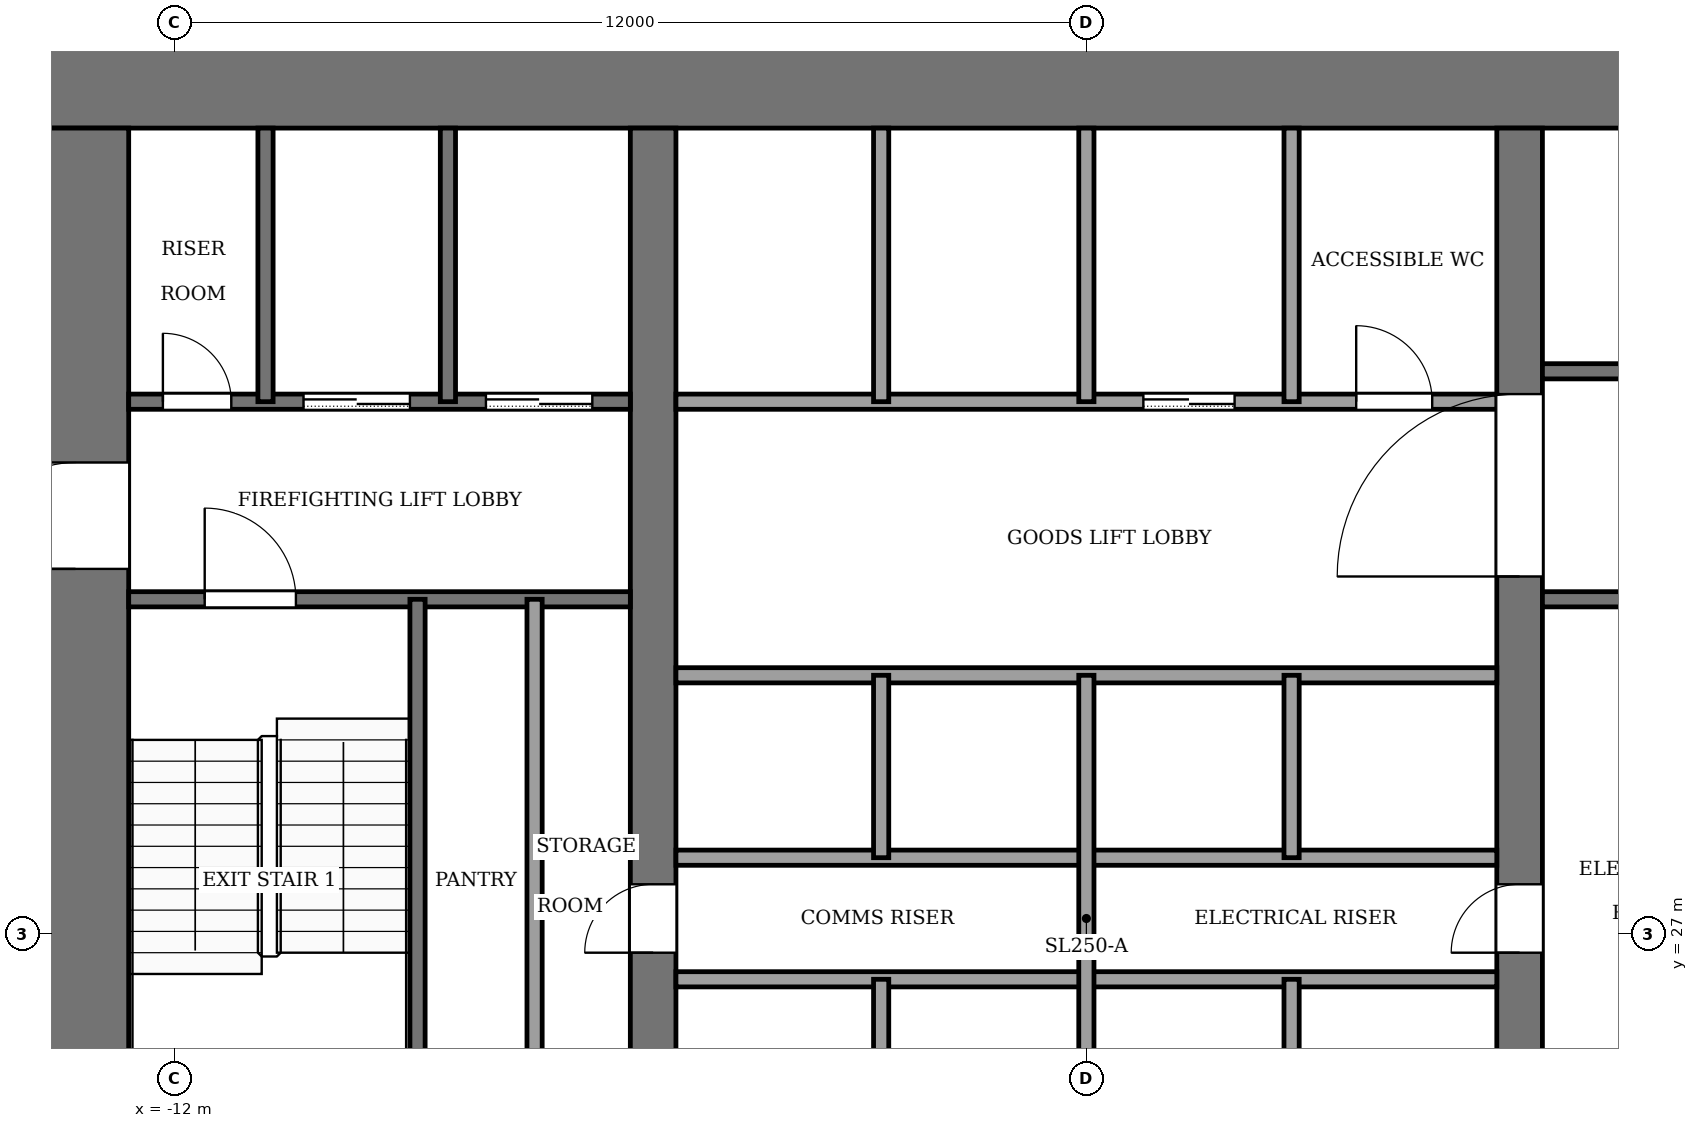
"""IFC4 building model, lengths in metres.
Left out: names, types, materials, properties, quantities, classifications, styles, units other than length and angle.
Written with IfcOpenShell. Run it as: python <this file> out.ifc"""

import sys

from ifc_helpers import new_model, si_unit, direction, frame, frame_2d, origin, place, context, subcontext, project, spatial, rectangle, extrude, element, fill, save


model = new_model("IFC4")
c1 = context("Model", 3, precision=1e-05, world=origin(), true_north=direction((0.0, 1.0)))
c2 = subcontext(c1, "Body", "Model", "MODEL_VIEW")
j1 = project(units=[si_unit("LENGTHUNIT", "METRE"), si_unit("PLANEANGLEUNIT", "RADIAN")], contexts=[c1])
p1 = place(None, origin())
s1 = spatial("IfcSite", under=j1, at=p1, CompositionType="ELEMENT")
p2 = place(p1, origin())
s2 = spatial("IfcBuilding", under=s1, at=p2, CompositionType="ELEMENT")
p3 = place(p2, frame((0.0, 0.0, 34.0)))
s3 = spatial("IfcBuildingStorey", under=s2, at=p3, CompositionType="ELEMENT", Elevation=34.0)
p4 = place(p3, frame((-14.0, 38.3, -0.13), z_axis=(0.0, 0.0, 1.0), x_axis=(1.0, 0.0, 0.0)))
e1 = element("IfcWall", 1, at=p4, inside=s3, PredefinedType="SHEAR", context=c2, shape_type="SweptSolid", body=[
    extrude(rectangle(XDim=28.0, YDim=1.4, at=frame_2d((14.0, 0.0))), origin(), (0.0, 0.0, 1.0), 4.0),
])
p5 = place(p3, frame((-13.3, 18.4, -0.13), z_axis=(0.0, 0.0, 1.0), x_axis=(0.0, 1.0, 0.0)))
e2 = element("IfcWall", 2, at=p5, inside=s3, PredefinedType="SHEAR", context=c2, shape_type="SweptSolid", body=[
    extrude(rectangle(XDim=19.2, YDim=1.4, at=frame_2d((9.6, 0.0))), origin(), (0.0, 0.0, 1.0), 4.0),
])
p6 = place(p5, frame((2.8, 0.0, 0.13)))
e3 = element("IfcOpeningElement", 3, at=p6, cuts=e2, PredefinedType="OPENING", context=c2, shape_type="SweptSolid", body=[
    extrude(rectangle(XDim=2.4, YDim=2.4, at=frame_2d((1.2, 1.2))), frame((0.0, 0.71, 0.0), z_axis=(0.0, -1.0, 0.0), x_axis=(1.0, 0.0, 0.0)), (0.0, 0.0, 1.0), 1.42),
])
p7 = place(p5, frame((13.4, 0.0, 0.13)))
e4 = element("IfcOpeningElement", 4, at=p7, cuts=e2, PredefinedType="OPENING", context=c2, shape_type="SweptSolid", body=[
    extrude(rectangle(XDim=1.4, YDim=2.2, at=frame_2d((0.7, 1.1))), frame((0.0, 0.71, 0.0), z_axis=(0.0, -1.0, 0.0), x_axis=(1.0, 0.0, 0.0)), (0.0, 0.0, 1.0), 1.42),
])
p8 = place(p3, frame((-5.7, 18.4, -0.13), z_axis=(0.0, 0.0, 1.0), x_axis=(0.0, 1.0, 0.0)))
e5 = element("IfcWall", 5, at=p8, inside=s3, PredefinedType="SHEAR", context=c2, shape_type="SweptSolid", body=[
    extrude(rectangle(XDim=19.2, YDim=0.6, at=frame_2d((9.6, 0.0))), origin(), (0.0, 0.0, 1.0), 4.0),
])
p9 = place(p8, frame((8.35, 0.0, 0.13)))
e6 = element("IfcOpeningElement", 6, at=p9, cuts=e5, PredefinedType="OPENING", context=c2, shape_type="SweptSolid", body=[
    extrude(rectangle(XDim=0.9, YDim=2.1, at=frame_2d((0.45, 1.05))), frame((0.0, 0.31, 0.0), z_axis=(0.0, -1.0, 0.0), x_axis=(1.0, 0.0, 0.0)), (0.0, 0.0, 1.0), 0.62),
])
p10 = place(p3, frame((5.7, 18.4, -0.13), z_axis=(0.0, 0.0, 1.0), x_axis=(0.0, 1.0, 0.0)))
e7 = element("IfcWall", 7, at=p10, inside=s3, PredefinedType="SHEAR", context=c2, shape_type="SweptSolid", body=[
    extrude(rectangle(XDim=19.2, YDim=0.6, at=frame_2d((9.6, 0.0))), origin(), (0.0, 0.0, 1.0), 4.0),
])
p11 = place(p10, frame((8.35, 0.0, 0.13)))
e8 = element("IfcOpeningElement", 8, at=p11, cuts=e7, PredefinedType="OPENING", context=c2, shape_type="SweptSolid", body=[
    extrude(rectangle(XDim=0.9, YDim=2.1, at=frame_2d((0.45, 1.05))), frame((0.0, 0.31, 0.0), z_axis=(0.0, -1.0, 0.0), x_axis=(1.0, 0.0, 0.0)), (0.0, 0.0, 1.0), 0.62),
])
p12 = place(p10, frame((13.3, 0.0, 0.13)))
e9 = element("IfcOpeningElement", 9, at=p12, cuts=e7, PredefinedType="OPENING", context=c2, shape_type="SweptSolid", body=[
    extrude(rectangle(XDim=2.4, YDim=2.4, at=frame_2d((1.2, 1.2))), frame((0.0, 0.31, 0.0), z_axis=(0.0, -1.0, 0.0), x_axis=(1.0, 0.0, 0.0)), (0.0, 0.0, 1.0), 0.62),
])
for number, where, z_axis, x_axis in (
    (10, (-5.4, 26.4, 0.0), (0.0, 0.0, 1.0), (1.0, 0.0, 0.0)),
    (11, (-5.4, 28.0, 0.0), (0.0, 0.0, 1.0), (1.0, 0.0, 0.0)),
    (12, (-5.4, 30.4, 0.0), (0.0, 0.0, 1.0), (1.0, 0.0, 0.0)),
):
    element("IfcWall", number, at=place(p3, frame(where, z_axis=z_axis, x_axis=x_axis)), inside=s3, PredefinedType="PARTITIONING", context=c2, shape_type="SweptSolid", body=[
        extrude(rectangle(XDim=10.8, YDim=0.2, at=frame_2d((5.4, 0.0))), origin(), (0.0, 0.0, 1.0), 3.87),
    ])
p13 = place(p3, frame((-12.6, 31.4, 0.0), z_axis=(0.0, 0.0, 1.0), x_axis=(1.0, 0.0, 0.0)))
e13 = element("IfcWall", 13, at=p13, inside=s3, PredefinedType="PARTITIONING", context=c2, shape_type="SweptSolid", body=[
    extrude(rectangle(XDim=6.6, YDim=0.2, at=frame_2d((3.3, 0.0))), origin(), (0.0, 0.0, 1.0), 3.87),
])
p14 = place(p13, frame((1.0, 0.0, 0.0)))
e14 = element("IfcOpeningElement", 14, at=p14, cuts=e13, PredefinedType="OPENING", context=c2, shape_type="SweptSolid", body=[
    extrude(rectangle(XDim=1.2, YDim=2.2, at=frame_2d((0.6, 1.1))), frame((0.0, 0.11, 0.0), z_axis=(0.0, -1.0, 0.0), x_axis=(1.0, 0.0, 0.0)), (0.0, 0.0, 1.0), 0.22),
])
p15 = place(p3, frame((6.0, 31.4, 0.0), z_axis=(0.0, 0.0, 1.0), x_axis=(1.0, 0.0, 0.0)))
e15 = element("IfcWall", 15, at=p15, inside=s3, PredefinedType="PARTITIONING", context=c2, shape_type="SweptSolid", body=[
    extrude(rectangle(XDim=6.6, YDim=0.2, at=frame_2d((3.3, 0.0))), origin(), (0.0, 0.0, 1.0), 3.87),
])
p16 = place(p3, frame((-12.6, 34.0, 0.0), z_axis=(0.0, 0.0, 1.0), x_axis=(1.0, 0.0, 0.0)))
e16 = element("IfcWall", 16, at=p16, inside=s3, PredefinedType="PARTITIONING", context=c2, shape_type="SweptSolid", body=[
    extrude(rectangle(XDim=6.6, YDim=0.2, at=frame_2d((3.3, 0.0))), origin(), (0.0, 0.0, 1.0), 3.87),
])
p17 = place(p16, frame((4.7, 0.0, 0.0)))
e17 = element("IfcOpeningElement", 17, at=p17, cuts=e16, PredefinedType="OPENING", context=c2, shape_type="SweptSolid", body=[
    extrude(rectangle(XDim=1.4, YDim=2.2, at=frame_2d((0.7, 1.1))), frame((0.0, 0.11, 0.0), z_axis=(0.0, -1.0, 0.0), x_axis=(1.0, 0.0, 0.0)), (0.0, 0.0, 1.0), 0.22),
])
p18 = place(p16, frame((2.3, 0.0, 0.0)))
e18 = element("IfcOpeningElement", 18, at=p18, cuts=e16, PredefinedType="OPENING", context=c2, shape_type="SweptSolid", body=[
    extrude(rectangle(XDim=1.4, YDim=2.2, at=frame_2d((0.7, 1.1))), frame((0.0, 0.11, 0.0), z_axis=(0.0, -1.0, 0.0), x_axis=(1.0, 0.0, 0.0)), (0.0, 0.0, 1.0), 0.22),
])
p19 = place(p16, frame((0.45, 0.0, 0.0)))
e19 = element("IfcOpeningElement", 19, at=p19, cuts=e16, PredefinedType="OPENING", context=c2, shape_type="SweptSolid", body=[
    extrude(rectangle(XDim=0.9, YDim=2.1, at=frame_2d((0.45, 1.05))), frame((0.0, 0.11, 0.0), z_axis=(0.0, -1.0, 0.0), x_axis=(1.0, 0.0, 0.0)), (0.0, 0.0, 1.0), 0.22),
])
p20 = place(p3, frame((-5.4, 34.0, 0.0), z_axis=(0.0, 0.0, 1.0), x_axis=(1.0, 0.0, 0.0)))
e20 = element("IfcWall", 20, at=p20, inside=s3, PredefinedType="PARTITIONING", context=c2, shape_type="SweptSolid", body=[
    extrude(rectangle(XDim=10.8, YDim=0.2, at=frame_2d((5.4, 0.0))), origin(), (0.0, 0.0, 1.0), 3.87),
])
p21 = place(p20, frame((6.15, 0.0, 0.0)))
e21 = element("IfcOpeningElement", 21, at=p21, cuts=e20, PredefinedType="OPENING", context=c2, shape_type="SweptSolid", body=[
    extrude(rectangle(XDim=1.2, YDim=2.2, at=frame_2d((0.6, 1.1))), frame((0.0, 0.11, 0.0), z_axis=(0.0, -1.0, 0.0), x_axis=(1.0, 0.0, 0.0)), (0.0, 0.0, 1.0), 0.22),
])
p22 = place(p20, frame((8.95, 0.0, 0.0)))
e22 = element("IfcOpeningElement", 22, at=p22, cuts=e20, PredefinedType="OPENING", context=c2, shape_type="SweptSolid", body=[
    extrude(rectangle(XDim=1.0, YDim=2.1, at=frame_2d((0.5, 1.05))), frame((0.0, 0.11, 0.0), z_axis=(0.0, -1.0, 0.0), x_axis=(1.0, 0.0, 0.0)), (0.0, 0.0, 1.0), 0.22),
])
p23 = place(p3, frame((6.0, 34.4, 0.0), z_axis=(0.0, 0.0, 1.0), x_axis=(1.0, 0.0, 0.0)))
e23 = element("IfcWall", 23, at=p23, inside=s3, PredefinedType="PARTITIONING", context=c2, shape_type="SweptSolid", body=[
    extrude(rectangle(XDim=6.6, YDim=0.2, at=frame_2d((3.3, 0.0))), origin(), (0.0, 0.0, 1.0), 3.87),
])
p24 = place(p23, frame((4.8, 0.0, 0.0)))
e24 = element("IfcOpeningElement", 24, at=p24, cuts=e23, PredefinedType="OPENING", context=c2, shape_type="SweptSolid", body=[
    extrude(rectangle(XDim=1.2, YDim=2.2, at=frame_2d((0.6, 1.1))), frame((0.0, 0.11, 0.0), z_axis=(0.0, -1.0, 0.0), x_axis=(1.0, 0.0, 0.0)), (0.0, 0.0, 1.0), 0.22),
])
p25 = place(p3, frame((-10.8, 34.0, 0.0), z_axis=(0.0, 0.0, 1.0), x_axis=(0.0, 1.0, 0.0)))
e25 = element("IfcWall", 25, at=p25, inside=s3, PredefinedType="PARTITIONING", context=c2, shape_type="SweptSolid", body=[
    extrude(rectangle(XDim=3.6, YDim=0.2, at=frame_2d((1.8, 0.0))), origin(), (0.0, 0.0, 1.0), 3.87),
])
p26 = place(p3, frame((-8.8, 24.0, 0.0), z_axis=(0.0, 0.0, 1.0), x_axis=(0.0, 1.0, 0.0)))
e26 = element("IfcWall", 26, at=p26, inside=s3, PredefinedType="PARTITIONING", context=c2, shape_type="SweptSolid", body=[
    extrude(rectangle(XDim=7.4, YDim=0.2, at=frame_2d((3.7, 0.0))), origin(), (0.0, 0.0, 1.0), 3.87),
])
p27 = place(p3, frame((-8.4, 34.0, 0.0), z_axis=(0.0, 0.0, 1.0), x_axis=(0.0, 1.0, 0.0)))
e27 = element("IfcWall", 27, at=p27, inside=s3, PredefinedType="PARTITIONING", context=c2, shape_type="SweptSolid", body=[
    extrude(rectangle(XDim=3.6, YDim=0.2, at=frame_2d((1.8, 0.0))), origin(), (0.0, 0.0, 1.0), 3.87),
])
p28 = place(p3, frame((-7.26, 24.0, 0.0), z_axis=(0.0, 0.0, 1.0), x_axis=(0.0, 1.0, 0.0)))
e28 = element("IfcWall", 28, at=p28, inside=s3, PredefinedType="PARTITIONING", context=c2, shape_type="SweptSolid", body=[
    extrude(rectangle(XDim=7.4, YDim=0.2, at=frame_2d((3.7, 0.0))), origin(), (0.0, 0.0, 1.0), 3.87),
])
for number, where, z_axis, x_axis in (
    (29, (-2.7, 24.0, 0.0), (0.0, 0.0, 1.0), (0.0, 1.0, 0.0)),
    (30, (-2.7, 28.0, 0.0), (0.0, 0.0, 1.0), (0.0, 1.0, 0.0)),
):
    element("IfcWall", number, at=place(p3, frame(where, z_axis=z_axis, x_axis=x_axis)), inside=s3, PredefinedType="PARTITIONING", context=c2, shape_type="SweptSolid", body=[
        extrude(rectangle(XDim=2.4, YDim=0.2, at=frame_2d((1.2, 0.0))), origin(), (0.0, 0.0, 1.0), 3.87),
    ])
p29 = place(p3, frame((-2.7, 34.0, 0.0), z_axis=(0.0, 0.0, 1.0), x_axis=(0.0, 1.0, 0.0)))
e31 = element("IfcWall", 31, at=p29, inside=s3, PredefinedType="PARTITIONING", context=c2, shape_type="SweptSolid", body=[
    extrude(rectangle(XDim=3.6, YDim=0.2, at=frame_2d((1.8, 0.0))), origin(), (0.0, 0.0, 1.0), 3.87),
])
p30 = place(p3, frame((0.0, 24.0, 0.0), z_axis=(0.0, 0.0, 1.0), x_axis=(0.0, 1.0, 0.0)))
e32 = element("IfcWall", 32, at=p30, inside=s3, PredefinedType="PARTITIONING", context=c2, shape_type="SweptSolid", body=[
    extrude(rectangle(XDim=6.4, YDim=0.2, at=frame_2d((3.2, 0.0))), origin(), (0.0, 0.0, 1.0), 3.87),
])
p31 = place(p3, frame((0.0, 34.0, 0.0), z_axis=(0.0, 0.0, 1.0), x_axis=(0.0, 1.0, 0.0)))
e33 = element("IfcWall", 33, at=p31, inside=s3, PredefinedType="PARTITIONING", context=c2, shape_type="SweptSolid", body=[
    extrude(rectangle(XDim=3.6, YDim=0.2, at=frame_2d((1.8, 0.0))), origin(), (0.0, 0.0, 1.0), 3.87),
])
for number, where, z_axis, x_axis in (
    (34, (2.7, 24.0, 0.0), (0.0, 0.0, 1.0), (0.0, 1.0, 0.0)),
    (35, (2.7, 28.0, 0.0), (0.0, 0.0, 1.0), (0.0, 1.0, 0.0)),
):
    element("IfcWall", number, at=place(p3, frame(where, z_axis=z_axis, x_axis=x_axis)), inside=s3, PredefinedType="PARTITIONING", context=c2, shape_type="SweptSolid", body=[
        extrude(rectangle(XDim=2.4, YDim=0.2, at=frame_2d((1.2, 0.0))), origin(), (0.0, 0.0, 1.0), 3.87),
    ])
p32 = place(p3, frame((2.7, 34.0, 0.0), z_axis=(0.0, 0.0, 1.0), x_axis=(0.0, 1.0, 0.0)))
e36 = element("IfcWall", 36, at=p32, inside=s3, PredefinedType="PARTITIONING", context=c2, shape_type="SweptSolid", body=[
    extrude(rectangle(XDim=3.6, YDim=0.2, at=frame_2d((1.8, 0.0))), origin(), (0.0, 0.0, 1.0), 3.87),
])
p33 = place(p21, origin())
e37 = element("IfcDoor", 37, at=p33, inside=s3, OperationType="SLIDING_TO_LEFT", PredefinedType="DOOR", context=c2, shape_type="SweptSolid", body=[
    extrude(rectangle(XDim=1.2, YDim=2.2, at=frame_2d((0.6, 1.1))), frame((0.0, 0.025, 0.0), z_axis=(0.0, -1.0, 0.0), x_axis=(1.0, 0.0, 0.0)), (0.0, 0.0, 1.0), 0.05),
])
fill(e21, e37)
p34 = place(p17, origin())
e38 = element("IfcDoor", 38, at=p34, inside=s3, OperationType="SLIDING_TO_LEFT", PredefinedType="DOOR", context=c2, shape_type="SweptSolid", body=[
    extrude(rectangle(XDim=1.4, YDim=2.2, at=frame_2d((0.7, 1.1))), frame((0.0, 0.025, 0.0), z_axis=(0.0, -1.0, 0.0), x_axis=(1.0, 0.0, 0.0)), (0.0, 0.0, 1.0), 0.05),
])
fill(e17, e38)
p35 = place(p18, origin())
e39 = element("IfcDoor", 39, at=p35, inside=s3, OperationType="SLIDING_TO_LEFT", PredefinedType="DOOR", context=c2, shape_type="SweptSolid", body=[
    extrude(rectangle(XDim=1.4, YDim=2.2, at=frame_2d((0.7, 1.1))), frame((0.0, 0.025, 0.0), z_axis=(0.0, -1.0, 0.0), x_axis=(1.0, 0.0, 0.0)), (0.0, 0.0, 1.0), 0.05),
])
fill(e18, e39)
p36 = place(p19, origin())
e40 = element("IfcDoor", 40, at=p36, inside=s3, OperationType="SINGLE_SWING_RIGHT", PredefinedType="DOOR", context=c2, shape_type="SweptSolid", body=[
    extrude(rectangle(XDim=0.9, YDim=2.1, at=frame_2d((0.45, 1.05))), frame((0.0, 0.025, 0.0), z_axis=(0.0, -1.0, 0.0), x_axis=(1.0, 0.0, 0.0)), (0.0, 0.0, 1.0), 0.05),
])
fill(e19, e40)
p37 = place(p22, origin())
e41 = element("IfcDoor", 41, at=p37, inside=s3, OperationType="SINGLE_SWING_LEFT", PredefinedType="DOOR", context=c2, shape_type="SweptSolid", body=[
    extrude(rectangle(XDim=1.0, YDim=2.1, at=frame_2d((0.5, 1.05))), frame((0.0, 0.025, 0.0), z_axis=(0.0, -1.0, 0.0), x_axis=(1.0, 0.0, 0.0)), (0.0, 0.0, 1.0), 0.05),
])
fill(e22, e41)
p38 = place(p9, origin())
e42 = element("IfcDoor", 42, at=p38, inside=s3, OperationType="SINGLE_SWING_LEFT", PredefinedType="DOOR", context=c2, shape_type="SweptSolid", body=[
    extrude(rectangle(XDim=0.9, YDim=2.1, at=frame_2d((0.45, 1.05))), frame((0.0, 0.025, 0.0), z_axis=(0.0, -1.0, 0.0), x_axis=(1.0, 0.0, 0.0)), (0.0, 0.0, 1.0), 0.05),
])
fill(e6, e42)
p39 = place(p11, origin())
e43 = element("IfcDoor", 43, at=p39, inside=s3, OperationType="SINGLE_SWING_RIGHT", PredefinedType="DOOR", context=c2, shape_type="SweptSolid", body=[
    extrude(rectangle(XDim=0.9, YDim=2.1, at=frame_2d((0.45, 1.05))), frame((0.0, 0.025, 0.0), z_axis=(0.0, -1.0, 0.0), x_axis=(1.0, 0.0, 0.0)), (0.0, 0.0, 1.0), 0.05),
])
fill(e8, e43)
p40 = place(p14, origin())
e44 = element("IfcDoor", 44, at=p40, inside=s3, OperationType="SINGLE_SWING_RIGHT", PredefinedType="DOOR", context=c2, shape_type="SweptSolid", body=[
    extrude(rectangle(XDim=1.2, YDim=2.2, at=frame_2d((0.6, 1.1))), frame((0.0, 0.025, 0.0), z_axis=(0.0, -1.0, 0.0), x_axis=(1.0, 0.0, 0.0)), (0.0, 0.0, 1.0), 0.05),
])
fill(e14, e44)
p41 = place(p12, origin())
e45 = element("IfcDoor", 45, at=p41, inside=s3, OperationType="DOUBLE_DOOR_SINGLE_SWING", PredefinedType="DOOR", context=c2, shape_type="SweptSolid", body=[
    extrude(rectangle(XDim=2.4, YDim=2.4, at=frame_2d((1.2, 1.2))), frame((0.0, 0.025, 0.0), z_axis=(0.0, -1.0, 0.0), x_axis=(1.0, 0.0, 0.0)), (0.0, 0.0, 1.0), 0.05),
])
fill(e9, e45)
p42 = place(p7, origin())
e46 = element("IfcDoor", 46, at=p42, inside=s3, OperationType="SINGLE_SWING_RIGHT", PredefinedType="DOOR", context=c2, shape_type="SweptSolid", body=[
    extrude(rectangle(XDim=1.4, YDim=2.2, at=frame_2d((0.7, 1.1))), frame((0.0, 0.025, 0.0), z_axis=(0.0, -1.0, 0.0), x_axis=(1.0, 0.0, 0.0)), (0.0, 0.0, 1.0), 0.05),
])
fill(e4, e46)
save(model, sys.argv[1])
